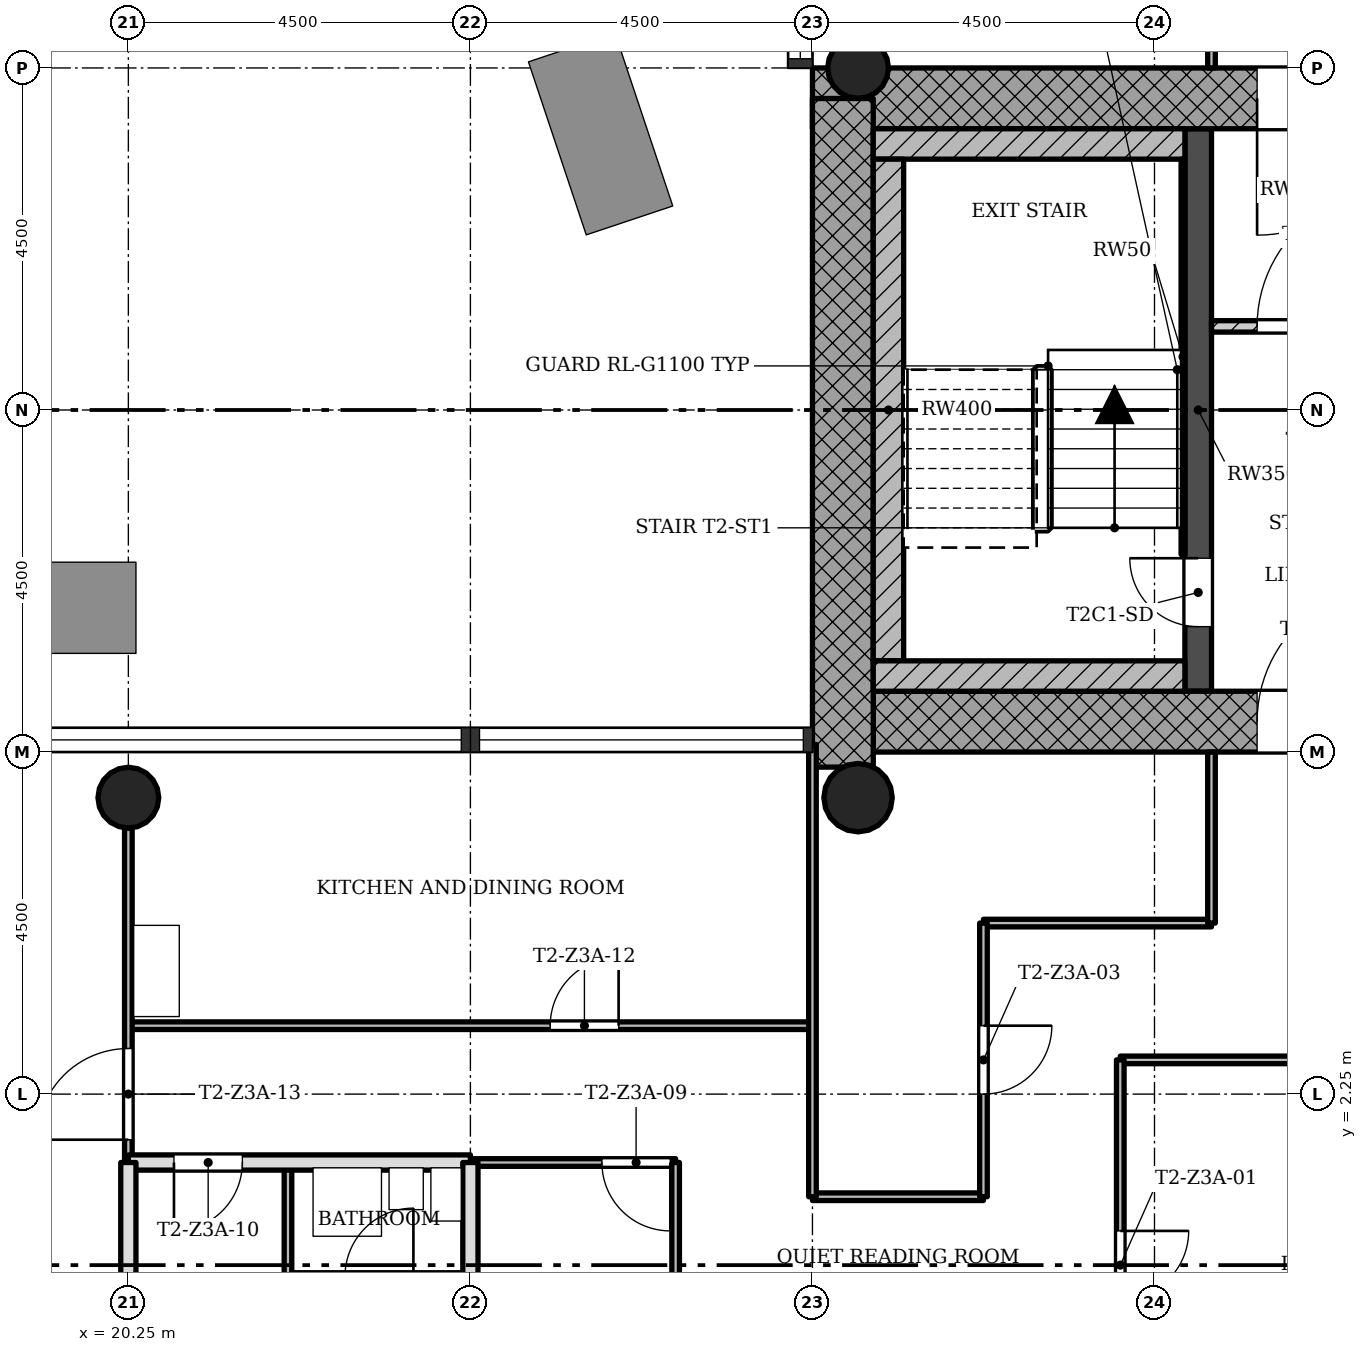
"""IFC4 building model, lengths in metres.
Left out: names, types, materials, properties, quantities, classifications, styles, units other than length and angle.
Written with IfcOpenShell. Run it as: python <this file> out.ifc"""

import sys

from ifc_helpers import new_model, si_unit, direction, frame, frame_2d, origin, origin_2d, place, context, subcontext, project, spatial, rectangle, hollow_circle, extrude, element, fill, save


model = new_model("IFC4")
c1 = context("Model", 3, precision=1e-05, world=origin(), true_north=direction((0.0, 1.0)))
c2 = subcontext(c1, "Body", "Model", "MODEL_VIEW")
j1 = project(units=[si_unit("LENGTHUNIT", "METRE"), si_unit("PLANEANGLEUNIT", "RADIAN")], contexts=[c1])
p1 = place(None, origin())
s1 = spatial("IfcSite", under=j1, at=p1, CompositionType="ELEMENT")
p2 = place(p1, origin())
s2 = spatial("IfcBuilding", under=s1, at=p2, CompositionType="ELEMENT")
p3 = place(p2, frame((0.0, 0.0, 137.1)))
s3 = spatial("IfcBuildingStorey", under=s2, at=p3, CompositionType="ELEMENT", Elevation=137.1)
p4 = place(p3, frame((30.05, 7.15, 0.0), z_axis=(0.0, 0.0, 1.0), x_axis=(1.0, 0.0, 0.0)))
e1 = element("IfcWall", 1, at=p4, inside=s3, PredefinedType="SHEAR", context=c2, shape_type="SweptSolid", body=[
    extrude(rectangle(XDim=12.7, YDim=0.8, at=frame_2d((6.35, 0.0))), origin(), (0.0, 0.0, 1.0), 3.4),
])
p5 = place(p4, frame((5.05, 0.0, 0.0)))
e2 = element("IfcOpeningElement", 2, at=p5, cuts=e1, PredefinedType="OPENING", context=c2, shape_type="SweptSolid", body=[
    extrude(rectangle(XDim=1.8, YDim=2.1, at=frame_2d((0.9, 1.05))), frame((0.0, 0.41, 0.0), z_axis=(0.0, -1.0, 0.0), x_axis=(1.0, 0.0, 0.0)), (0.0, 0.0, 1.0), 0.82),
])
p6 = place(p3, frame((41.95, 15.35, 0.0), z_axis=(0.0, 0.0, 1.0), x_axis=(-1.0, 0.0, 0.0)))
e3 = element("IfcWall", 3, at=p6, inside=s3, PredefinedType="SHEAR", context=c2, shape_type="SweptSolid", body=[
    extrude(rectangle(XDim=12.7, YDim=0.8, at=frame_2d((6.35, 0.0))), origin(), (0.0, 0.0, 1.0), 3.4),
])
p7 = place(p6, frame((5.05, 0.0, 0.0)))
e4 = element("IfcOpeningElement", 4, at=p7, cuts=e3, PredefinedType="OPENING", context=c2, shape_type="SweptSolid", body=[
    extrude(rectangle(XDim=1.8, YDim=2.1, at=frame_2d((0.9, 1.05))), frame((0.0, 0.41, 0.0), z_axis=(0.0, -1.0, 0.0), x_axis=(1.0, 0.0, 0.0)), (0.0, 0.0, 1.0), 0.82),
])
p8 = place(p3, frame((29.65, 15.348, 0.0), z_axis=(0.0, 0.0, 1.0), x_axis=(0.0, -1.0, 0.0)))
e5 = element("IfcWall", 5, at=p8, inside=s3, PredefinedType="SHEAR", context=c2, shape_type="SweptSolid", body=[
    extrude(rectangle(XDim=8.796, YDim=0.8, at=frame_2d((4.398, 0.0))), origin(), (0.0, 0.0, 1.0), 3.4),
])
p9 = place(p3, frame((34.325, 7.55, 0.0), z_axis=(0.0, 0.0, 1.0), x_axis=(0.0, 1.0, 0.0)))
e6 = element("IfcWall", 6, at=p9, inside=s3, PredefinedType="SHEAR", context=c2, shape_type="SweptSolid", body=[
    extrude(rectangle(XDim=7.4, YDim=0.35, at=frame_2d((3.7, 0.0))), origin(), (0.0, 0.0, 1.0), 3.4),
])
p10 = place(p9, frame((0.85, 0.0, 0.0)))
e7 = element("IfcOpeningElement", 7, at=p10, cuts=e6, PredefinedType="OPENING", context=c2, shape_type="SweptSolid", body=[
    extrude(rectangle(XDim=0.9, YDim=2.1, at=frame_2d((0.45, 1.05))), frame((0.0, 0.185, 0.0), z_axis=(0.0, -1.0, 0.0), x_axis=(1.0, 0.0, 0.0)), (0.0, 0.0, 1.0), 0.37),
])
for number, where, z_axis, x_axis in (
    (8, (29.85, 15.75, 0.0), (0.0, 0.0, 1.0), (1.0, 0.0, 0.0)),
    (9, (20.25, 6.15, 0.0), (0.0, 0.0, 1.0), (1.0, 0.0, 0.0)),
):
    element("IfcColumn", number, at=place(p3, frame(where, z_axis=z_axis, x_axis=x_axis)), inside=s3, PredefinedType="COLUMN", context=c2, shape_type="SweptSolid", body=[
        extrude(hollow_circle(Radius=0.4, WallThickness=0.028, at=origin_2d()), origin(), (0.0, 0.0, 1.0), 3.4),
    ])
p11 = place(p3, frame((29.85, 6.15, 0.0), z_axis=(0.0, 0.0, 1.0), x_axis=(1.0, 0.0, 0.0)))
e10 = element("IfcColumn", 10, at=p11, inside=s3, PredefinedType="COLUMN", context=c2, shape_type="SweptSolid", body=[
    extrude(hollow_circle(Radius=0.45, WallThickness=0.032, at=origin_2d()), origin(), (0.0, 0.0, 1.0), 3.4),
])
p12 = place(p3, frame((37.5, 12.35, 0.0), z_axis=(0.0, 0.0, 1.0), x_axis=(-1.0, 0.0, 0.0)))
e11 = element("IfcWall", 11, at=p12, inside=s3, PredefinedType="PARTITIONING", context=c2, shape_type="SweptSolid", body=[
    extrude(rectangle(XDim=3.0, YDim=0.15, at=frame_2d((1.5, 0.0))), origin(), (0.0, 0.0, 1.0), 3.0),
])
p13 = place(p12, frame((0.6, 0.0, 0.0)))
e12 = element("IfcOpeningElement", 12, at=p13, cuts=e11, PredefinedType="OPENING", context=c2, shape_type="SweptSolid", body=[
    extrude(rectangle(XDim=1.8, YDim=2.1, at=frame_2d((0.9, 1.05))), frame((0.0, 0.085, 0.0), z_axis=(0.0, -1.0, 0.0), x_axis=(1.0, 0.0, 0.0)), (0.0, 0.0, 1.0), 0.17),
])
p14 = place(p3, frame((24.75, -0.15, 0.0), z_axis=(0.0, 0.0, 1.0), x_axis=(-1.0, 0.0, 0.0)))
e13 = element("IfcWall", 13, at=p14, inside=s3, PredefinedType="PARTITIONING", context=c2, shape_type="SweptSolid", body=[
    extrude(rectangle(XDim=2.4, YDim=0.1, at=frame_2d((1.2, 0.0))), origin(), (0.0, 0.0, 1.0), 3.0),
])
p15 = place(p14, frame((0.75, 0.0, 0.0)))
e14 = element("IfcOpeningElement", 14, at=p15, cuts=e13, PredefinedType="OPENING", context=c2, shape_type="SweptSolid", body=[
    extrude(rectangle(XDim=0.9, YDim=2.1, at=frame_2d((0.45, 1.05))), frame((0.0, 0.06, 0.0), z_axis=(0.0, -1.0, 0.0), x_axis=(1.0, 0.0, 0.0)), (0.0, 0.0, 1.0), 0.12),
])
p16 = place(p3, frame((31.5, 0.9, 0.0), z_axis=(0.0, 0.0, 1.0), x_axis=(-1.0, 0.0, 0.0)))
e15 = element("IfcWall", 15, at=p16, inside=s3, PredefinedType="PARTITIONING", context=c2, shape_type="SweptSolid", body=[
    extrude(rectangle(XDim=2.25, YDim=0.1, at=frame_2d((1.125, 0.0))), origin(), (0.0, 0.0, 1.0), 3.0),
])
p17 = place(p3, frame((27.45, 1.35, 0.0), z_axis=(0.0, 0.0, 1.0), x_axis=(-1.0, 0.0, 0.0)))
e16 = element("IfcWall", 16, at=p17, inside=s3, PredefinedType="PARTITIONING", context=c2, shape_type="SweptSolid", body=[
    extrude(rectangle(XDim=2.7, YDim=0.1, at=frame_2d((1.35, 0.0))), origin(), (0.0, 0.0, 1.0), 3.0),
])
p18 = place(p17, frame((0.07, 0.0, 0.0)))
e17 = element("IfcOpeningElement", 17, at=p18, cuts=e16, PredefinedType="OPENING", context=c2, shape_type="SweptSolid", body=[
    extrude(rectangle(XDim=0.9, YDim=2.1, at=frame_2d((0.45, 1.05))), frame((0.0, 0.06, 0.0), z_axis=(0.0, -1.0, 0.0), x_axis=(1.0, 0.0, 0.0)), (0.0, 0.0, 1.0), 0.12),
])
p19 = place(p3, frame((24.75, 1.35, 0.0), z_axis=(0.0, 0.0, 1.0), x_axis=(-1.0, 0.0, 0.0)))
e18 = element("IfcWall", 18, at=p19, inside=s3, PredefinedType="SOLIDWALL", context=c2, shape_type="SweptSolid", body=[
    extrude(rectangle(XDim=4.5, YDim=0.2, at=frame_2d((2.25, 0.0))), origin(), (0.0, 0.0, 1.0), 3.0),
])
p20 = place(p19, frame((3.0, 0.0, 0.0)))
e19 = element("IfcOpeningElement", 19, at=p20, cuts=e18, PredefinedType="OPENING", context=c2, shape_type="SweptSolid", body=[
    extrude(rectangle(XDim=0.9, YDim=2.1, at=frame_2d((0.45, 1.05))), frame((0.0, 0.11, 0.0), z_axis=(0.0, -1.0, 0.0), x_axis=(1.0, 0.0, 0.0)), (0.0, 0.0, 1.0), 0.22),
])
p21 = place(p3, frame((38.7, 2.7, 0.0), z_axis=(0.0, 0.0, 1.0), x_axis=(-1.0, 0.0, 0.0)))
e20 = element("IfcWall", 20, at=p21, inside=s3, PredefinedType="PARTITIONING", context=c2, shape_type="SweptSolid", body=[
    extrude(rectangle(XDim=5.4, YDim=0.1, at=frame_2d((2.7, 0.0))), origin(), (0.0, 0.0, 1.0), 3.0),
])
p22 = place(p3, frame((29.25, 3.15, 0.0), z_axis=(0.0, 0.0, 1.0), x_axis=(-1.0, 0.0, 0.0)))
e21 = element("IfcWall", 21, at=p22, inside=s3, PredefinedType="PARTITIONING", context=c2, shape_type="SweptSolid", body=[
    extrude(rectangle(XDim=9.0, YDim=0.1, at=frame_2d((4.5, 0.0))), origin(), (0.0, 0.0, 1.0), 3.0),
])
p23 = place(p22, frame((2.55, 0.0, 0.0)))
e22 = element("IfcOpeningElement", 22, at=p23, cuts=e21, PredefinedType="OPENING", context=c2, shape_type="SweptSolid", body=[
    extrude(rectangle(XDim=0.9, YDim=2.1, at=frame_2d((0.45, 1.05))), frame((0.0, 0.06, 0.0), z_axis=(0.0, -1.0, 0.0), x_axis=(1.0, 0.0, 0.0)), (0.0, 0.0, 1.0), 0.12),
])
p24 = place(p3, frame((34.5, 4.5, 0.0), z_axis=(0.0, 0.0, 1.0), x_axis=(-1.0, 0.0, 0.0)))
e23 = element("IfcWall", 23, at=p24, inside=s3, PredefinedType="PARTITIONING", context=c2, shape_type="SweptSolid", body=[
    extrude(rectangle(XDim=3.0, YDim=0.1, at=frame_2d((1.5, 0.0))), origin(), (0.0, 0.0, 1.0), 3.0),
])
p25 = place(p3, frame((34.5, 4.5, 0.0), z_axis=(0.0, 0.0, 1.0), x_axis=(0.0, 1.0, 0.0)))
e24 = element("IfcWall", 24, at=p25, inside=s3, PredefinedType="PARTITIONING", context=c2, shape_type="SweptSolid", body=[
    extrude(rectangle(XDim=2.25, YDim=0.1, at=frame_2d((1.125, 0.0))), origin(), (0.0, 0.0, 1.0), 3.0),
])
p26 = place(p3, frame((34.5, 15.75, 0.0), z_axis=(0.0, 0.0, 1.0), x_axis=(0.0, 1.0, 0.0)))
e25 = element("IfcWall", 25, at=p26, inside=s3, PredefinedType="PARTITIONING", context=c2, shape_type="SweptSolid", body=[
    extrude(rectangle(XDim=4.5, YDim=0.1, at=frame_2d((2.25, 0.0))), origin(), (0.0, 0.0, 1.0), 3.0),
])
p27 = place(p26, frame((1.8, 0.0, 0.0)))
e26 = element("IfcOpeningElement", 26, at=p27, cuts=e25, PredefinedType="OPENING", context=c2, shape_type="SweptSolid", body=[
    extrude(rectangle(XDim=0.9, YDim=2.1, at=frame_2d((0.45, 1.05))), frame((0.0, 0.06, 0.0), z_axis=(0.0, -1.0, 0.0), x_axis=(1.0, 0.0, 0.0)), (0.0, 0.0, 1.0), 0.12),
])
p28 = place(p3, frame((33.3, -2.7, 0.0), z_axis=(0.0, 0.0, 1.0), x_axis=(0.0, 1.0, 0.0)))
e27 = element("IfcWall", 27, at=p28, inside=s3, PredefinedType="PARTITIONING", context=c2, shape_type="SweptSolid", body=[
    extrude(rectangle(XDim=5.4, YDim=0.1, at=frame_2d((2.7, 0.0))), origin(), (0.0, 0.0, 1.0), 3.0),
])
p29 = place(p28, frame((2.25, 0.0, 0.0)))
e28 = element("IfcOpeningElement", 28, at=p29, cuts=e27, PredefinedType="OPENING", context=c2, shape_type="SweptSolid", body=[
    extrude(rectangle(XDim=0.9, YDim=2.1, at=frame_2d((0.45, 1.05))), frame((0.0, 0.06, 0.0), z_axis=(0.0, -1.0, 0.0), x_axis=(1.0, 0.0, 0.0)), (0.0, 0.0, 1.0), 0.12),
])
p30 = place(p3, frame((31.5, 0.9, 0.0), z_axis=(0.0, 0.0, 1.0), x_axis=(0.0, 1.0, 0.0)))
e29 = element("IfcWall", 29, at=p30, inside=s3, PredefinedType="PARTITIONING", context=c2, shape_type="SweptSolid", body=[
    extrude(rectangle(XDim=3.6, YDim=0.1, at=frame_2d((1.8, 0.0))), origin(), (0.0, 0.0, 1.0), 3.0),
])
p31 = place(p30, frame((1.35, 0.0, 0.0)))
e30 = element("IfcOpeningElement", 30, at=p31, cuts=e29, PredefinedType="OPENING", context=c2, shape_type="SweptSolid", body=[
    extrude(rectangle(XDim=0.9, YDim=2.1, at=frame_2d((0.45, 1.05))), frame((0.0, 0.06, 0.0), z_axis=(0.0, -1.0, 0.0), x_axis=(1.0, 0.0, 0.0)), (0.0, 0.0, 1.0), 0.12),
])
p32 = place(p3, frame((29.25, 0.9, 0.0), z_axis=(0.0, 0.0, 1.0), x_axis=(0.0, 1.0, 0.0)))
e31 = element("IfcWall", 31, at=p32, inside=s3, PredefinedType="PARTITIONING", context=c2, shape_type="SweptSolid", body=[
    extrude(rectangle(XDim=5.95, YDim=0.1, at=frame_2d((2.975, 0.0))), origin(), (0.0, 0.0, 1.0), 3.0),
])
p33 = place(p3, frame((27.45, -0.9, 0.0), z_axis=(0.0, 0.0, 1.0), x_axis=(0.0, 1.0, 0.0)))
e32 = element("IfcWall", 32, at=p33, inside=s3, PredefinedType="PARTITIONING", context=c2, shape_type="SweptSolid", body=[
    extrude(rectangle(XDim=2.25, YDim=0.1, at=frame_2d((1.125, 0.0))), origin(), (0.0, 0.0, 1.0), 3.0),
])
p34 = place(p3, frame((24.75, -6.85, 0.0), z_axis=(0.0, 0.0, 1.0), x_axis=(0.0, 1.0, 0.0)))
e33 = element("IfcWall", 33, at=p34, inside=s3, PredefinedType="SOLIDWALL", context=c2, shape_type="SweptSolid", body=[
    extrude(rectangle(XDim=8.2, YDim=0.2, at=frame_2d((4.1, 0.0))), origin(), (0.0, 0.0, 1.0), 3.0),
])
p35 = place(p3, frame((22.35, -0.15, 0.0), z_axis=(0.0, 0.0, 1.0), x_axis=(0.0, 1.0, 0.0)))
e34 = element("IfcWall", 34, at=p35, inside=s3, PredefinedType="PARTITIONING", context=c2, shape_type="SweptSolid", body=[
    extrude(rectangle(XDim=1.5, YDim=0.1, at=frame_2d((0.75, 0.0))), origin(), (0.0, 0.0, 1.0), 3.0),
])
p36 = place(p3, frame((20.25, 1.35, 0.0), z_axis=(0.0, 0.0, 1.0), x_axis=(0.0, 1.0, 0.0)))
e35 = element("IfcWall", 35, at=p36, inside=s3, PredefinedType="PARTITIONING", context=c2, shape_type="SweptSolid", body=[
    extrude(rectangle(XDim=4.4, YDim=0.1, at=frame_2d((2.2, 0.0))), origin(), (0.0, 0.0, 1.0), 3.0),
])
p37 = place(p36, frame((0.3, 0.0, 0.0)))
e36 = element("IfcOpeningElement", 36, at=p37, cuts=e35, PredefinedType="OPENING", context=c2, shape_type="SweptSolid", body=[
    extrude(rectangle(XDim=1.2, YDim=2.1, at=frame_2d((0.6, 1.05))), frame((0.0, 0.06, 0.0), z_axis=(0.0, -1.0, 0.0), x_axis=(1.0, 0.0, 0.0)), (0.0, 0.0, 1.0), 0.12),
])
p38 = place(p3, frame((20.25, -5.75, 0.0), z_axis=(0.0, 0.0, 1.0), x_axis=(0.0, 1.0, 0.0)))
e37 = element("IfcWall", 37, at=p38, inside=s3, PredefinedType="SOLIDWALL", context=c2, shape_type="SweptSolid", body=[
    extrude(rectangle(XDim=7.1, YDim=0.2, at=frame_2d((3.55, 0.0))), origin(), (0.0, 0.0, 1.0), 3.0),
])
p39 = place(p3, frame((34.15, 14.75, 0.0), z_axis=(0.0, 0.0, 1.0), x_axis=(-1.0, 0.0, 0.0)))
e38 = element("IfcWall", 38, at=p39, inside=s3, PredefinedType="SHEAR", context=c2, shape_type="SweptSolid", body=[
    extrude(rectangle(XDim=4.1, YDim=0.4, at=frame_2d((2.05, 0.0))), origin(), (0.0, 0.0, 1.0), 3.4),
])
p40 = place(p3, frame((30.25, 7.95, 0.0), z_axis=(0.0, 0.0, 1.0), x_axis=(0.0, 1.0, 0.0)))
e39 = element("IfcWall", 39, at=p40, inside=s3, PredefinedType="SHEAR", context=c2, shape_type="SweptSolid", body=[
    extrude(rectangle(XDim=6.6, YDim=0.4, at=frame_2d((3.3, 0.0))), origin(), (0.0, 0.0, 1.0), 3.4),
])
p41 = place(p3, frame((34.15, 7.75, 0.0), z_axis=(0.0, 0.0, 1.0), x_axis=(-1.0, 0.0, 0.0)))
e40 = element("IfcWall", 40, at=p41, inside=s3, PredefinedType="SHEAR", context=c2, shape_type="SweptSolid", body=[
    extrude(rectangle(XDim=4.1, YDim=0.4, at=frame_2d((2.05, 0.0))), origin(), (0.0, 0.0, 1.0), 3.4),
])
p42 = place(p3, frame((34.125, 9.35, 0.0), z_axis=(0.0, 0.0, 1.0), x_axis=(0.0, 1.0, 0.0)))
e41 = element("IfcWall", 41, at=p42, inside=s3, PredefinedType="SHEAR", context=c2, shape_type="SweptSolid", body=[
    extrude(rectangle(XDim=5.2, YDim=0.05, at=frame_2d((2.6, 0.0))), origin(), (0.0, 0.0, 1.0), 3.4),
])
p43 = place(p13, origin())
e42 = element("IfcDoor", 42, at=p43, inside=s3, OperationType="SINGLE_SWING_LEFT", PredefinedType="DOOR", context=c2, shape_type="SweptSolid", body=[
    extrude(rectangle(XDim=1.8, YDim=2.1, at=frame_2d((0.9, 1.05))), frame((0.0, 0.025, 0.0), z_axis=(0.0, -1.0, 0.0), x_axis=(1.0, 0.0, 0.0)), (0.0, 0.0, 1.0), 0.05),
])
fill(e12, e42)
p44 = place(p29, origin())
e43 = element("IfcDoor", 43, at=p44, inside=s3, OperationType="SINGLE_SWING_RIGHT", PredefinedType="DOOR", context=c2, shape_type="SweptSolid", body=[
    extrude(rectangle(XDim=0.9, YDim=2.1, at=frame_2d((0.45, 1.05))), frame((0.0, 0.025, 0.0), z_axis=(0.0, -1.0, 0.0), x_axis=(1.0, 0.0, 0.0)), (0.0, 0.0, 1.0), 0.05),
])
fill(e28, e43)
p45 = place(p31, origin())
e44 = element("IfcDoor", 44, at=p45, inside=s3, OperationType="SINGLE_SWING_RIGHT", PredefinedType="DOOR", context=c2, shape_type="SweptSolid", body=[
    extrude(rectangle(XDim=0.9, YDim=2.1, at=frame_2d((0.45, 1.05))), frame((0.0, 0.025, 0.0), z_axis=(0.0, -1.0, 0.0), x_axis=(1.0, 0.0, 0.0)), (0.0, 0.0, 1.0), 0.05),
])
fill(e30, e44)
p46 = place(p18, origin())
e45 = element("IfcDoor", 45, at=p46, inside=s3, OperationType="SINGLE_SWING_RIGHT", PredefinedType="DOOR", context=c2, shape_type="SweptSolid", body=[
    extrude(rectangle(XDim=0.9, YDim=2.1, at=frame_2d((0.45, 1.05))), frame((0.0, 0.025, 0.0), z_axis=(0.0, -1.0, 0.0), x_axis=(1.0, 0.0, 0.0)), (0.0, 0.0, 1.0), 0.05),
])
fill(e17, e45)
p47 = place(p20, origin())
e46 = element("IfcDoor", 46, at=p47, inside=s3, OperationType="SINGLE_SWING_LEFT", PredefinedType="DOOR", context=c2, shape_type="SweptSolid", body=[
    extrude(rectangle(XDim=0.9, YDim=2.1, at=frame_2d((0.45, 1.05))), frame((0.0, 0.025, 0.0), z_axis=(0.0, -1.0, 0.0), x_axis=(1.0, 0.0, 0.0)), (0.0, 0.0, 1.0), 0.05),
])
fill(e19, e46)
p48 = place(p23, origin())
e47 = element("IfcDoor", 47, at=p48, inside=s3, OperationType="SINGLE_SWING_LEFT", PredefinedType="DOOR", context=c2, shape_type="SweptSolid", body=[
    extrude(rectangle(XDim=0.9, YDim=2.1, at=frame_2d((0.45, 1.05))), frame((0.0, 0.025, 0.0), z_axis=(0.0, -1.0, 0.0), x_axis=(1.0, 0.0, 0.0)), (0.0, 0.0, 1.0), 0.05),
])
fill(e22, e47)
p49 = place(p37, origin())
e48 = element("IfcDoor", 48, at=p49, inside=s3, OperationType="SINGLE_SWING_RIGHT", PredefinedType="DOOR", context=c2, shape_type="SweptSolid", body=[
    extrude(rectangle(XDim=1.2, YDim=2.1, at=frame_2d((0.6, 1.05))), frame((0.0, 0.025, 0.0), z_axis=(0.0, -1.0, 0.0), x_axis=(1.0, 0.0, 0.0)), (0.0, 0.0, 1.0), 0.05),
])
fill(e36, e48)
p50 = place(p10, origin())
e49 = element("IfcDoor", 49, at=p50, inside=s3, OperationType="SINGLE_SWING_LEFT", PredefinedType="DOOR", context=c2, shape_type="SweptSolid", body=[
    extrude(rectangle(XDim=0.9, YDim=2.1, at=frame_2d((0.45, 1.05))), frame((0.0, 0.025, 0.0), z_axis=(0.0, -1.0, 0.0), x_axis=(1.0, 0.0, 0.0)), (0.0, 0.0, 1.0), 0.05),
])
fill(e7, e49)
p51 = place(p5, origin())
e50 = element("IfcDoor", 50, at=p51, inside=s3, OperationType="SINGLE_SWING_LEFT", PredefinedType="DOOR", context=c2, shape_type="SweptSolid", body=[
    extrude(rectangle(XDim=1.8, YDim=2.1, at=frame_2d((0.9, 1.05))), frame((0.0, 0.025, 0.0), z_axis=(0.0, -1.0, 0.0), x_axis=(1.0, 0.0, 0.0)), (0.0, 0.0, 1.0), 0.05),
])
fill(e2, e50)
p52 = place(p7, origin())
e51 = element("IfcDoor", 51, at=p52, inside=s3, OperationType="SINGLE_SWING_LEFT", PredefinedType="DOOR", context=c2, shape_type="SweptSolid", body=[
    extrude(rectangle(XDim=1.8, YDim=2.1, at=frame_2d((0.9, 1.05))), frame((0.0, 0.025, 0.0), z_axis=(0.0, -1.0, 0.0), x_axis=(1.0, 0.0, 0.0)), (0.0, 0.0, 1.0), 0.05),
])
fill(e4, e51)
save(model, sys.argv[1])
